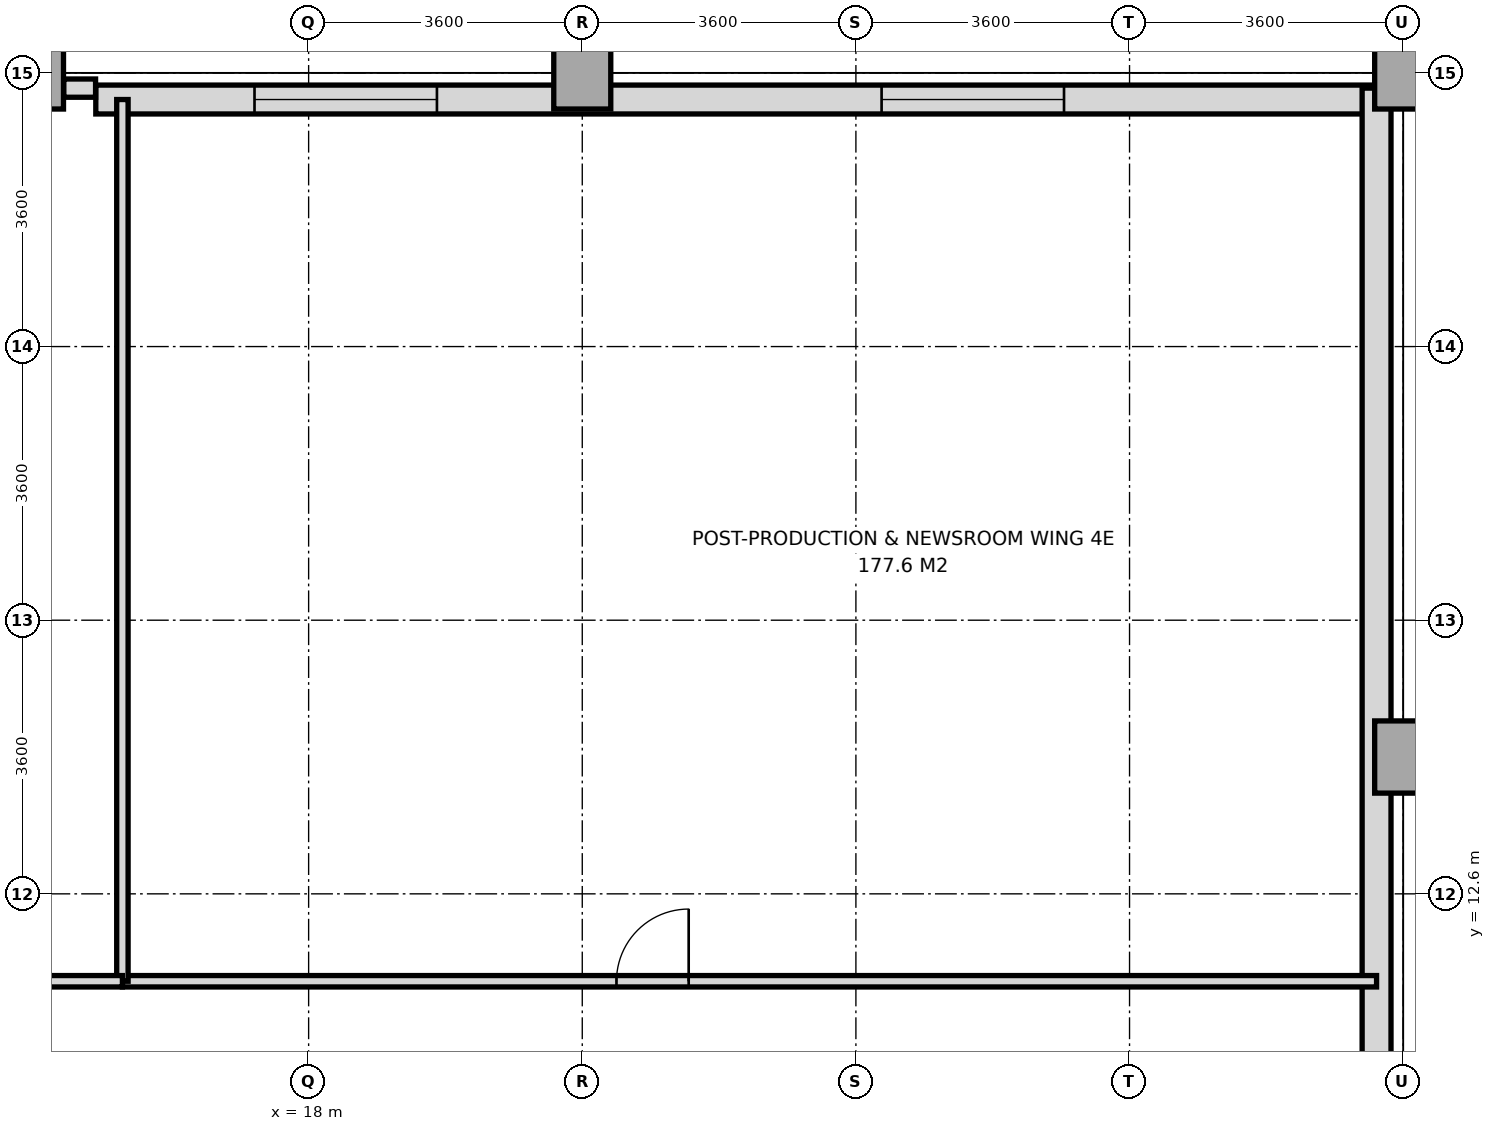
"""IFC4 building model, lengths in metres.
Left out: names, types, materials, properties, quantities, classifications, styles, units other than length and angle.
Written with IfcOpenShell. Run it as: python <this file> out.ifc"""

import sys

from ifc_helpers import new_model, si_unit, direction, frame, frame_2d, origin, origin_2d, place, context, subcontext, project, spatial, rectangle, extrude, source, transform, mapped, element, fill, save


model = new_model("IFC4")
c1 = context("Model", 3, precision=1e-05, world=origin(), true_north=direction((0.0, 1.0)))
c2 = subcontext(c1, "Body", "Model", "MODEL_VIEW")
j1 = project(units=[si_unit("LENGTHUNIT", "METRE"), si_unit("PLANEANGLEUNIT", "RADIAN")], contexts=[c1])
p1 = place(None, origin())
s1 = spatial("IfcSite", under=j1, at=p1, CompositionType="ELEMENT")
p2 = place(p1, origin())
s2 = spatial("IfcBuilding", under=s1, at=p2, CompositionType="ELEMENT")
p3 = place(p2, frame((0.0, 0.0, 20.4)))
s3 = spatial("IfcBuildingStorey", under=s2, at=p3, CompositionType="ELEMENT", Elevation=20.4)
m1 = source(origin(), c2, "Body", "SweptSolid", [
    extrude(rectangle(XDim=0.75, YDim=0.95, at=origin_2d()), origin(), (0.0, 0.0, 1.0), 4.48),
])
for number, where, z_axis, x_axis in (
    (1, (14.4, 23.4, 0.0), (0.0, 0.0, 1.0), (1.0, 0.0, 0.0)),
    (2, (21.6, 23.4, 0.0), (0.0, 0.0, 1.0), (1.0, 0.0, 0.0)),
    (3, (32.4, 14.4, 0.0), (0.0, 0.0, 1.0), (1.0, 0.0, 0.0)),
    (4, (32.4, 23.4, 0.0), (0.0, 0.0, 1.0), (1.0, 0.0, 0.0)),
):
    element("IfcColumn", number, at=place(p3, frame(where, z_axis=z_axis, x_axis=x_axis)), inside=s3, PredefinedType="COLUMN", context=c2, shape_type="MappedRepresentation", body=[
        mapped(m1, transform((0.0, 0.0, 0.0), x_axis=(1.0, 0.0, 0.0), y_axis=(0.0, 1.0, 0.0), z_axis=(0.0, 0.0, 1.0), scale=1.0)),
    ])
p4 = place(p3, frame((15.2, 23.05, 0.0), z_axis=(0.0, 0.0, 1.0), x_axis=(1.0, 0.0, 0.0)))
e5 = element("IfcWall", 5, at=p4, inside=s3, PredefinedType="SOLIDWALL", context=c2, shape_type="SweptSolid", body=[
    extrude(rectangle(XDim=16.85, YDim=0.38, at=frame_2d((8.425, 0.0))), origin(), (0.0, 0.0, 1.0), 4.48),
])
p5 = place(p4, frame((2.088, 0.0, 0.95)))
e6 = element("IfcOpeningElement", 6, at=p5, cuts=e5, PredefinedType="OPENING", context=c2, shape_type="SweptSolid", body=[
    extrude(rectangle(XDim=2.4, YDim=2.2, at=frame_2d((1.2, 1.1))), frame((0.0, 0.2, 0.0), z_axis=(0.0, -1.0, 0.0), x_axis=(1.0, 0.0, 0.0)), (0.0, 0.0, 1.0), 0.4),
])
p6 = place(p4, frame((10.338, 0.0, 0.95)))
e7 = element("IfcOpeningElement", 7, at=p6, cuts=e5, PredefinedType="OPENING", context=c2, shape_type="SweptSolid", body=[
    extrude(rectangle(XDim=2.4, YDim=2.2, at=frame_2d((1.2, 1.1))), frame((0.0, 0.2, 0.0), z_axis=(0.0, -1.0, 0.0), x_axis=(1.0, 0.0, 0.0)), (0.0, 0.0, 1.0), 0.4),
])
p7 = place(p3, frame((32.05, -18.8, 0.0), z_axis=(0.0, 0.0, 1.0), x_axis=(0.0, 1.0, 0.0)))
e8 = element("IfcWall", 8, at=p7, inside=s3, PredefinedType="SOLIDWALL", context=c2, shape_type="SweptSolid", body=[
    extrude(rectangle(XDim=42.0, YDim=0.38, at=frame_2d((21.0, 0.0))), origin(), (0.0, 0.0, 1.0), 4.48),
])
p8 = place(p7, frame((5.9, 0.0, 0.95)))
e9 = element("IfcOpeningElement", 9, at=p8, cuts=e8, PredefinedType="OPENING", context=c2, shape_type="SweptSolid", body=[
    extrude(rectangle(XDim=2.4, YDim=2.2, at=frame_2d((1.2, 1.1))), frame((0.0, 0.2, 0.0), z_axis=(0.0, -1.0, 0.0), x_axis=(1.0, 0.0, 0.0)), (0.0, 0.0, 1.0), 0.4),
])
p9 = place(p7, frame((13.1, 0.0, 0.95)))
e10 = element("IfcOpeningElement", 10, at=p9, cuts=e8, PredefinedType="OPENING", context=c2, shape_type="SweptSolid", body=[
    extrude(rectangle(XDim=2.4, YDim=2.2, at=frame_2d((1.2, 1.1))), frame((0.0, 0.2, 0.0), z_axis=(0.0, -1.0, 0.0), x_axis=(1.0, 0.0, 0.0)), (0.0, 0.0, 1.0), 0.4),
])
p10 = place(p7, frame((22.1, 0.0, 0.95)))
e11 = element("IfcOpeningElement", 11, at=p10, cuts=e8, PredefinedType="OPENING", context=c2, shape_type="SweptSolid", body=[
    extrude(rectangle(XDim=2.4, YDim=2.2, at=frame_2d((1.2, 1.1))), frame((0.0, 0.2, 0.0), z_axis=(0.0, -1.0, 0.0), x_axis=(1.0, 0.0, 0.0)), (0.0, 0.0, 1.0), 0.4),
])
p11 = place(p3, frame((14.778, 23.2, 0.0), z_axis=(0.0, 0.0, 1.0), x_axis=(1.0, 0.0, 0.0)))
e12 = element("IfcWall", 12, at=p11, inside=s3, PredefinedType="PARAPET", context=c2, shape_type="SweptSolid", body=[
    extrude(rectangle(XDim=0.419, YDim=0.24, at=frame_2d((0.209, 0.0))), origin(), (0.0, 0.0, 1.0), 1.15),
])
p12 = place(p3, frame((15.55, 11.45, 0.0), z_axis=(0.0, 0.0, 1.0), x_axis=(1.0, 0.0, 0.0)))
e13 = element("IfcWall", 13, at=p12, inside=s3, PredefinedType="PARTITIONING", context=c2, shape_type="SweptSolid", body=[
    extrude(rectangle(XDim=16.5, YDim=0.15, at=frame_2d((8.25, 0.0))), origin(), (0.0, 0.0, 1.0), 4.48),
])
p13 = place(p12, frame((6.5, 0.0, 0.0)))
e14 = element("IfcOpeningElement", 14, at=p13, cuts=e13, PredefinedType="OPENING", context=c2, shape_type="SweptSolid", body=[
    extrude(rectangle(XDim=0.95, YDim=2.15, at=frame_2d((0.475, 1.075))), frame((0.0, 0.085, 0.0), z_axis=(0.0, -1.0, 0.0), x_axis=(1.0, 0.0, 0.0)), (0.0, 0.0, 1.0), 0.17),
])
p14 = place(p3, frame((15.55, 11.45, 0.0), z_axis=(0.0, 0.0, 1.0), x_axis=(0.0, 1.0, 0.0)))
e15 = element("IfcWall", 15, at=p14, inside=s3, PredefinedType="PARTITIONING", context=c2, shape_type="SweptSolid", body=[
    extrude(rectangle(XDim=11.6, YDim=0.15, at=frame_2d((5.8, 0.0))), origin(), (0.0, 0.0, 1.0), 4.48),
])
p15 = place(p3, frame((10.6, 11.45, 0.0), z_axis=(0.0, 0.0, 1.0), x_axis=(1.0, 0.0, 0.0)))
e16 = element("IfcWall", 16, at=p15, inside=s3, PredefinedType="PARTITIONING", context=c2, shape_type="SweptSolid", body=[
    extrude(rectangle(XDim=4.95, YDim=0.15, at=frame_2d((2.475, 0.0))), origin(), (0.0, 0.0, 1.0), 4.48),
])
p16 = place(p15, frame((2.0, 0.0, 0.0)))
e17 = element("IfcOpeningElement", 17, at=p16, cuts=e16, PredefinedType="OPENING", context=c2, shape_type="SweptSolid", body=[
    extrude(rectangle(XDim=0.95, YDim=2.15, at=frame_2d((0.475, 1.075))), frame((0.0, 0.085, 0.0), z_axis=(0.0, -1.0, 0.0), x_axis=(1.0, 0.0, 0.0)), (0.0, 0.0, 1.0), 0.17),
])
m2 = source(origin(), c2, "Body", "SweptSolid", [
    extrude(rectangle(XDim=2.4, YDim=2.2, at=frame_2d((1.2, 1.1))), frame((0.0, 0.03, 0.0), z_axis=(0.0, -1.0, 0.0), x_axis=(1.0, 0.0, 0.0)), (0.0, 0.0, 1.0), 0.06),
])
p17 = place(p5, origin())
e18 = element("IfcWindow", 18, at=p17, inside=s3, PartitioningType="SINGLE_PANEL", PredefinedType="WINDOW", context=c2, shape_type="MappedRepresentation", body=[
    mapped(m2, transform((0.0, 0.0, 0.0), x_axis=(1.0, 0.0, 0.0), y_axis=(0.0, 1.0, 0.0), z_axis=(0.0, 0.0, 1.0), scale=1.0)),
])
fill(e6, e18)
p18 = place(p6, origin())
e19 = element("IfcWindow", 19, at=p18, inside=s3, PartitioningType="SINGLE_PANEL", PredefinedType="WINDOW", context=c2, shape_type="MappedRepresentation", body=[
    mapped(m2, transform((0.0, 0.0, 0.0), x_axis=(1.0, 0.0, 0.0), y_axis=(0.0, 1.0, 0.0), z_axis=(0.0, 0.0, 1.0), scale=1.0)),
])
fill(e7, e19)
m3 = source(origin(), c2, "Body", "SweptSolid", [
    extrude(rectangle(XDim=0.95, YDim=2.15, at=frame_2d((0.475, 1.075))), frame((0.0, 0.025, 0.0), z_axis=(0.0, -1.0, 0.0), x_axis=(1.0, 0.0, 0.0)), (0.0, 0.0, 1.0), 0.05),
])
p19 = place(p13, origin())
e20 = element("IfcDoor", 20, at=p19, inside=s3, OperationType="SINGLE_SWING_RIGHT", PredefinedType="DOOR", context=c2, shape_type="MappedRepresentation", body=[
    mapped(m3, transform((0.0, 0.0, 0.0), x_axis=(1.0, 0.0, 0.0), y_axis=(0.0, 1.0, 0.0), z_axis=(0.0, 0.0, 1.0), scale=1.0)),
])
fill(e14, e20)
save(model, sys.argv[1])
